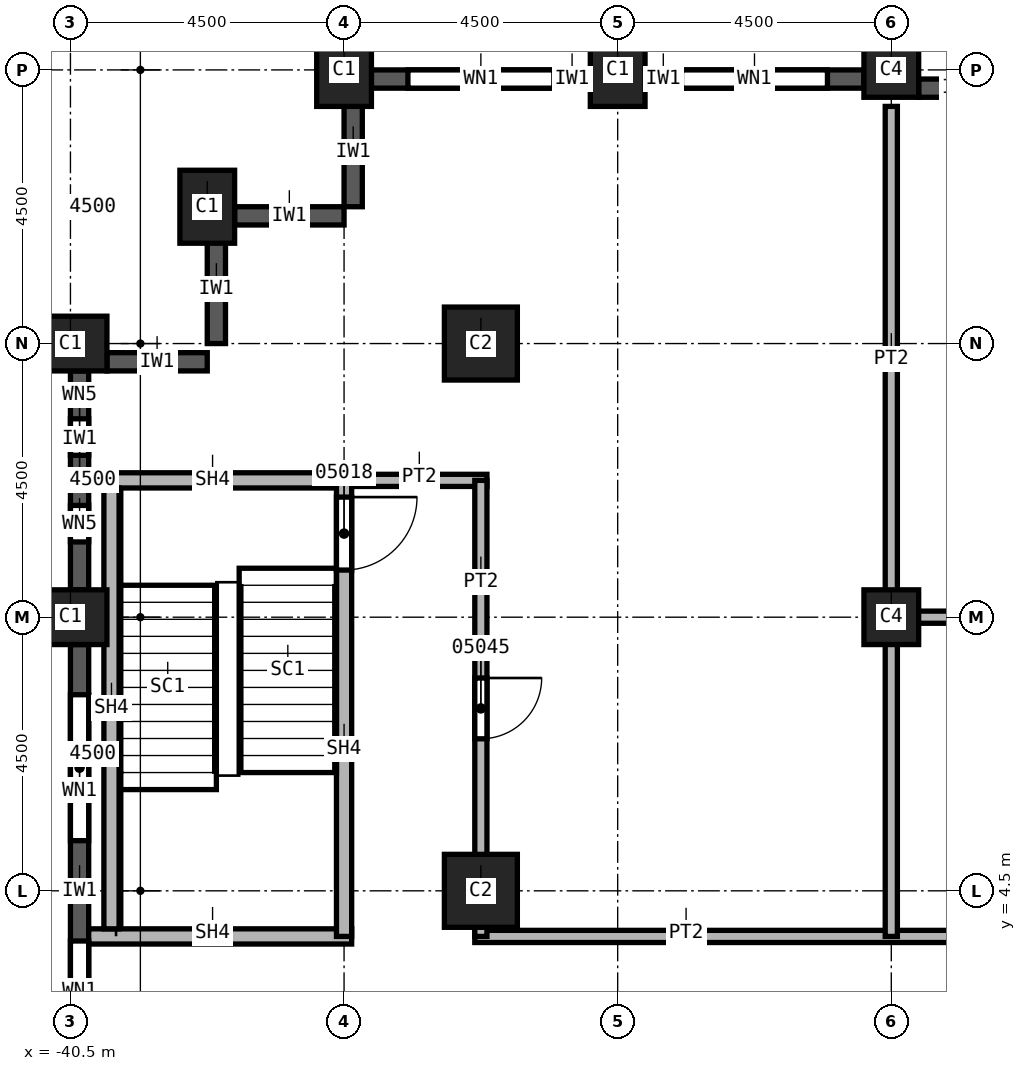
"""IFC4 building model, lengths in metres.
Left out: names, types, materials, properties, quantities, classifications, styles, units other than length and angle.
Written with IfcOpenShell. Run it as: python <this file> out.ifc"""

import sys

from ifc_helpers import new_model, si_unit, direction, frame, frame_2d, origin, origin_2d, place, context, subcontext, project, spatial, rectangle, extrude, element, fill, save


model = new_model("IFC4")
c1 = context("Model", 3, precision=1e-05, world=origin(), true_north=direction((0.0, 1.0)))
c2 = subcontext(c1, "Body", "Model", "MODEL_VIEW")
j1 = project(units=[si_unit("LENGTHUNIT", "METRE"), si_unit("PLANEANGLEUNIT", "RADIAN")], contexts=[c1])
p1 = place(None, origin())
s1 = spatial("IfcSite", under=j1, at=p1, CompositionType="ELEMENT")
p2 = place(p1, origin())
s2 = spatial("IfcBuilding", under=s1, at=p2, CompositionType="ELEMENT")
p3 = place(p2, frame((0.0, 0.0, 116.0)))
s3 = spatial("IfcBuildingStorey", under=s2, at=p3, CompositionType="ELEMENT", Elevation=116.0)
for number, where, z_axis, x_axis in (
    (1, (-40.5, 9.0, 0.0), (0.0, 0.0, 1.0), (0.0, 1.0, 0.0)),
    (2, (-40.5, 13.5, 0.0), (0.0, 0.0, 1.0), (0.0, 1.0, 0.0)),
    (3, (-38.25, 15.75, 0.0), (0.0, 0.0, 1.0), (1.0, 0.0, 0.0)),
    (4, (-31.5, 18.0, 0.0), (0.0, 0.0, 1.0), (1.0, 0.0, 0.0)),
    (5, (-36.0, 18.0, 0.0), (0.0, 0.0, 1.0), (1.0, 0.0, 0.0)),
):
    element("IfcColumn", number, at=place(p3, frame(where, z_axis=z_axis, x_axis=x_axis)), inside=s3, PredefinedType="COLUMN", context=c2, shape_type="SweptSolid", body=[
        extrude(rectangle(XDim=0.9, YDim=1.2, at=origin_2d()), origin(), (0.0, 0.0, 1.0), 3.6),
    ])
for number, where, z_axis, x_axis in (
    (6, (-33.75, 4.5, 0.0), (0.0, 0.0, 1.0), (1.0, 0.0, 0.0)),
    (7, (-33.75, 13.5, 0.0), (0.0, 0.0, 1.0), (1.0, 0.0, 0.0)),
):
    element("IfcColumn", number, at=place(p3, frame(where, z_axis=z_axis, x_axis=x_axis)), inside=s3, PredefinedType="COLUMN", context=c2, shape_type="SweptSolid", body=[
        extrude(rectangle(XDim=1.2, YDim=1.2, at=origin_2d()), origin(), (0.0, 0.0, 1.0), 3.6),
    ])
for number, where, z_axis, x_axis in (
    (8, (-27.0, 9.0, 0.0), (0.0, 0.0, 1.0), (1.0, 0.0, 0.0)),
    (9, (-27.0, 18.0, 0.0), (0.0, 0.0, 1.0), (1.0, 0.0, 0.0)),
):
    element("IfcColumn", number, at=place(p3, frame(where, z_axis=z_axis, x_axis=x_axis)), inside=s3, PredefinedType="COLUMN", context=c2, shape_type="SweptSolid", body=[
        extrude(rectangle(XDim=0.9, YDim=0.9, at=origin_2d()), origin(), (0.0, 0.0, 1.0), 3.6),
    ])
for number, where, z_axis, x_axis in (
    (10, (-35.85, 17.55, 0.0), (0.0, 0.0, 1.0), (0.0, -1.0, 0.0)),
    (11, (-37.8, 15.6, 0.0), (0.0, 0.0, 1.0), (1.0, 0.0, 0.0)),
    (12, (-38.1, 15.3, 0.0), (0.0, 0.0, 1.0), (0.0, -1.0, 0.0)),
):
    element("IfcWall", number, at=place(p3, frame(where, z_axis=z_axis, x_axis=x_axis)), inside=s3, PredefinedType="SOLIDWALL", context=c2, shape_type="SweptSolid", body=[
        extrude(rectangle(XDim=1.8, YDim=0.3, at=frame_2d((0.9, 0.0))), origin(), (0.0, 0.0, 1.0), 3.0),
    ])
p4 = place(p3, frame((-39.9, 13.2, 0.0), z_axis=(0.0, 0.0, 1.0), x_axis=(1.0, 0.0, 0.0)))
e13 = element("IfcWall", 13, at=p4, inside=s3, PredefinedType="SOLIDWALL", context=c2, shape_type="SweptSolid", body=[
    extrude(rectangle(XDim=1.65, YDim=0.3, at=frame_2d((0.825, 0.0))), origin(), (0.0, 0.0, 1.0), 3.0),
])
p5 = place(p3, frame((-25.2, 17.7, 0.0), z_axis=(0.0, 0.0, 1.0), x_axis=(-1.0, 0.0, 0.0)))
e14 = element("IfcWall", 14, at=p5, inside=s3, PredefinedType="SOLIDWALL", context=c2, shape_type="SweptSolid", body=[
    extrude(rectangle(XDim=1.35, YDim=0.3, at=frame_2d((0.675, 0.0))), origin(), (0.0, 0.0, 1.0), 3.0),
])
p6 = place(p3, frame((-27.45, 17.85, 0.0), z_axis=(0.0, 0.0, 1.0), x_axis=(-1.0, 0.0, 0.0)))
e15 = element("IfcWall", 15, at=p6, inside=s3, PredefinedType="SOLIDWALL", context=c2, shape_type="SweptSolid", body=[
    extrude(rectangle(XDim=3.6, YDim=0.3, at=frame_2d((1.8, 0.0))), origin(), (0.0, 0.0, 1.0), 3.0),
])
p7 = place(p6, frame((0.6, 0.0, 0.8)))
e16 = element("IfcOpeningElement", 16, at=p7, cuts=e15, PredefinedType="OPENING", context=c2, shape_type="SweptSolid", body=[
    extrude(rectangle(XDim=2.4, YDim=1.95, at=frame_2d((1.2, 0.975))), frame((0.0, 0.15, 0.0), z_axis=(0.0, -1.0, 0.0), x_axis=(1.0, 0.0, 0.0)), (0.0, 0.0, 1.0), 0.3),
])
p8 = place(p3, frame((-31.95, 17.85, 0.0), z_axis=(0.0, 0.0, 1.0), x_axis=(-1.0, 0.0, 0.0)))
e17 = element("IfcWall", 17, at=p8, inside=s3, PredefinedType="SOLIDWALL", context=c2, shape_type="SweptSolid", body=[
    extrude(rectangle(XDim=3.6, YDim=0.3, at=frame_2d((1.8, 0.0))), origin(), (0.0, 0.0, 1.0), 3.0),
])
p9 = place(p8, frame((0.6, 0.0, 0.8)))
e18 = element("IfcOpeningElement", 18, at=p9, cuts=e17, PredefinedType="OPENING", context=c2, shape_type="SweptSolid", body=[
    extrude(rectangle(XDim=2.4, YDim=1.95, at=frame_2d((1.2, 0.975))), frame((0.0, 0.15, 0.0), z_axis=(0.0, -1.0, 0.0), x_axis=(1.0, 0.0, 0.0)), (0.0, 0.0, 1.0), 0.3),
])
p10 = place(p3, frame((-40.35, 13.05, 0.0), z_axis=(0.0, 0.0, 1.0), x_axis=(0.0, -1.0, 0.0)))
e19 = element("IfcWall", 19, at=p10, inside=s3, PredefinedType="SOLIDWALL", context=c2, shape_type="SweptSolid", body=[
    extrude(rectangle(XDim=3.6, YDim=0.3, at=frame_2d((1.8, 0.0))), origin(), (0.0, 0.0, 1.0), 3.0),
])
p11 = place(p10, frame((0.788, 0.0, 0.8)))
e20 = element("IfcOpeningElement", 20, at=p11, cuts=e19, PredefinedType="OPENING", context=c2, shape_type="SweptSolid", body=[
    extrude(rectangle(XDim=0.6, YDim=1.95, at=frame_2d((0.3, 0.975))), frame((0.0, 0.15, 0.0), z_axis=(0.0, -1.0, 0.0), x_axis=(1.0, 0.0, 0.0)), (0.0, 0.0, 1.0), 0.3),
])
p12 = place(p10, frame((2.212, 0.0, 0.8)))
e21 = element("IfcOpeningElement", 21, at=p12, cuts=e19, PredefinedType="OPENING", context=c2, shape_type="SweptSolid", body=[
    extrude(rectangle(XDim=0.6, YDim=1.95, at=frame_2d((0.3, 0.975))), frame((0.0, 0.15, 0.0), z_axis=(0.0, -1.0, 0.0), x_axis=(1.0, 0.0, 0.0)), (0.0, 0.0, 1.0), 0.3),
])
p13 = place(p3, frame((-40.35, 8.55, 0.0), z_axis=(0.0, 0.0, 1.0), x_axis=(0.0, -1.0, 0.0)))
e22 = element("IfcWall", 22, at=p13, inside=s3, PredefinedType="SOLIDWALL", context=c2, shape_type="SweptSolid", body=[
    extrude(rectangle(XDim=8.1, YDim=0.3, at=frame_2d((4.05, 0.0))), origin(), (0.0, 0.0, 1.0), 3.0),
])
p14 = place(p13, frame((0.825, 0.0, 0.8)))
e23 = element("IfcOpeningElement", 23, at=p14, cuts=e22, PredefinedType="OPENING", context=c2, shape_type="SweptSolid", body=[
    extrude(rectangle(XDim=2.4, YDim=1.95, at=frame_2d((1.2, 0.975))), frame((0.0, 0.15, 0.0), z_axis=(0.0, -1.0, 0.0), x_axis=(1.0, 0.0, 0.0)), (0.0, 0.0, 1.0), 0.3),
])
p15 = place(p13, frame((4.875, 0.0, 0.8)))
e24 = element("IfcOpeningElement", 24, at=p15, cuts=e22, PredefinedType="OPENING", context=c2, shape_type="SweptSolid", body=[
    extrude(rectangle(XDim=2.4, YDim=1.95, at=frame_2d((1.2, 0.975))), frame((0.0, 0.15, 0.0), z_axis=(0.0, -1.0, 0.0), x_axis=(1.0, 0.0, 0.0)), (0.0, 0.0, 1.0), 0.3),
])
p16 = place(p3, frame((-36.0, 11.25, 0.0), z_axis=(0.0, 0.0, 1.0), x_axis=(1.0, 0.0, 0.0)))
e25 = element("IfcWall", 25, at=p16, inside=s3, PredefinedType="PARTITIONING", context=c2, shape_type="SweptSolid", body=[
    extrude(rectangle(XDim=2.35, YDim=0.2, at=frame_2d((1.175, 0.0))), origin(), (0.0, 0.0, 1.0), 3.6),
])
p17 = place(p3, frame((-33.85, 3.75, 0.0), z_axis=(0.0, 0.0, 1.0), x_axis=(1.0, 0.0, 0.0)))
e26 = element("IfcWall", 26, at=p17, inside=s3, PredefinedType="PARTITIONING", context=c2, shape_type="SweptSolid", body=[
    extrude(rectangle(XDim=13.95, YDim=0.2, at=frame_2d((6.975, 0.0))), origin(), (0.0, 0.0, 1.0), 3.6),
])
p18 = place(p17, frame((9.85, 0.0, 0.0)))
e27 = element("IfcOpeningElement", 27, at=p18, cuts=e26, PredefinedType="OPENING", context=c2, shape_type="SweptSolid", body=[
    extrude(rectangle(XDim=1.0, YDim=2.1, at=frame_2d((0.5, 1.05))), frame((0.0, 0.1, 0.0), z_axis=(0.0, -1.0, 0.0), x_axis=(1.0, 0.0, 0.0)), (0.0, 0.0, 1.0), 0.2),
])
p19 = place(p3, frame((-33.75, 11.25, 0.0), z_axis=(0.0, 0.0, 1.0), x_axis=(0.0, -1.0, 0.0)))
e28 = element("IfcWall", 28, at=p19, inside=s3, PredefinedType="PARTITIONING", context=c2, shape_type="SweptSolid", body=[
    extrude(rectangle(XDim=7.5, YDim=0.2, at=frame_2d((3.75, 0.0))), origin(), (0.0, 0.0, 1.0), 3.6),
])
p20 = place(p19, frame((3.25, 0.0, 0.0)))
e29 = element("IfcOpeningElement", 29, at=p20, cuts=e28, PredefinedType="OPENING", context=c2, shape_type="SweptSolid", body=[
    extrude(rectangle(XDim=1.0, YDim=2.1, at=frame_2d((0.5, 1.05))), frame((0.0, 0.1, 0.0), z_axis=(0.0, -1.0, 0.0), x_axis=(1.0, 0.0, 0.0)), (0.0, 0.0, 1.0), 0.2),
])
p21 = place(p3, frame((-27.1, 9.0, 0.0), z_axis=(0.0, 0.0, 1.0), x_axis=(1.0, 0.0, 0.0)))
e30 = element("IfcWall", 30, at=p21, inside=s3, PredefinedType="PARTITIONING", context=c2, shape_type="SweptSolid", body=[
    extrude(rectangle(XDim=7.2, YDim=0.2, at=frame_2d((3.6, 0.0))), origin(), (0.0, 0.0, 1.0), 3.6),
])
p22 = place(p3, frame((-27.0, 3.75, 0.0), z_axis=(0.0, 0.0, 1.0), x_axis=(0.0, 1.0, 0.0)))
e31 = element("IfcWall", 31, at=p22, inside=s3, PredefinedType="PARTITIONING", context=c2, shape_type="SweptSolid", body=[
    extrude(rectangle(XDim=13.65, YDim=0.2, at=frame_2d((6.825, 0.0))), origin(), (0.0, 0.0, 1.0), 3.6),
])
p23 = place(p3, frame((-40.2, 3.75, 0.0), z_axis=(0.0, 0.0, 1.0), x_axis=(1.0, 0.0, 0.0)))
e32 = element("IfcWall", 32, at=p23, inside=s3, PredefinedType="SOLIDWALL", context=c2, shape_type="SweptSolid", body=[
    extrude(rectangle(XDim=4.325, YDim=0.25, at=frame_2d((2.163, 0.0))), origin(), (0.0, 0.0, 1.0), 3.6),
])
p24 = place(p3, frame((-40.2, 11.25, 0.0), z_axis=(0.0, 0.0, 1.0), x_axis=(1.0, 0.0, 0.0)))
e33 = element("IfcWall", 33, at=p24, inside=s3, PredefinedType="SOLIDWALL", context=c2, shape_type="SweptSolid", body=[
    extrude(rectangle(XDim=4.2, YDim=0.25, at=frame_2d((2.1, 0.0))), origin(), (0.0, 0.0, 1.0), 3.6),
])
p25 = place(p3, frame((-36.0, 11.375, 0.0), z_axis=(0.0, 0.0, 1.0), x_axis=(0.0, -1.0, 0.0)))
e34 = element("IfcWall", 34, at=p25, inside=s3, PredefinedType="SOLIDWALL", context=c2, shape_type="SweptSolid", body=[
    extrude(rectangle(XDim=7.625, YDim=0.25, at=frame_2d((3.812, 0.0))), origin(), (0.0, 0.0, 1.0), 3.6),
])
p26 = place(p25, frame((0.4, 0.0, 0.0)))
e35 = element("IfcOpeningElement", 35, at=p26, cuts=e34, PredefinedType="OPENING", context=c2, shape_type="SweptSolid", body=[
    extrude(rectangle(XDim=1.2, YDim=2.1, at=frame_2d((0.6, 1.05))), frame((0.0, 0.125, 0.0), z_axis=(0.0, -1.0, 0.0), x_axis=(1.0, 0.0, 0.0)), (0.0, 0.0, 1.0), 0.25),
])
p27 = place(p3, frame((-39.825, 3.875, 0.0), z_axis=(0.0, 0.0, 1.0), x_axis=(0.0, 1.0, 0.0)))
e36 = element("IfcWall", 36, at=p27, inside=s3, PredefinedType="SOLIDWALL", context=c2, shape_type="SweptSolid", body=[
    extrude(rectangle(XDim=7.25, YDim=0.25, at=frame_2d((3.625, 0.0))), origin(), (0.0, 0.0, 1.0), 3.6),
])
p28 = place(p7, origin())
e37 = element("IfcWindow", 37, at=p28, inside=s3, PartitioningType="SINGLE_PANEL", PredefinedType="WINDOW", context=c2, shape_type="SweptSolid", body=[
    extrude(rectangle(XDim=2.4, YDim=1.95, at=frame_2d((1.2, 0.975))), frame((0.0, 0.03, 0.0), z_axis=(0.0, -1.0, 0.0), x_axis=(1.0, 0.0, 0.0)), (0.0, 0.0, 1.0), 0.06),
])
fill(e16, e37)
p29 = place(p9, origin())
e38 = element("IfcWindow", 38, at=p29, inside=s3, PartitioningType="SINGLE_PANEL", PredefinedType="WINDOW", context=c2, shape_type="SweptSolid", body=[
    extrude(rectangle(XDim=2.4, YDim=1.95, at=frame_2d((1.2, 0.975))), frame((0.0, 0.03, 0.0), z_axis=(0.0, -1.0, 0.0), x_axis=(1.0, 0.0, 0.0)), (0.0, 0.0, 1.0), 0.06),
])
fill(e18, e38)
p30 = place(p14, origin())
e39 = element("IfcWindow", 39, at=p30, inside=s3, PartitioningType="SINGLE_PANEL", PredefinedType="WINDOW", context=c2, shape_type="SweptSolid", body=[
    extrude(rectangle(XDim=2.4, YDim=1.95, at=frame_2d((1.2, 0.975))), frame((0.0, 0.03, 0.0), z_axis=(0.0, -1.0, 0.0), x_axis=(1.0, 0.0, 0.0)), (0.0, 0.0, 1.0), 0.06),
])
fill(e23, e39)
p31 = place(p15, origin())
e40 = element("IfcWindow", 40, at=p31, inside=s3, PartitioningType="SINGLE_PANEL", PredefinedType="WINDOW", context=c2, shape_type="SweptSolid", body=[
    extrude(rectangle(XDim=2.4, YDim=1.95, at=frame_2d((1.2, 0.975))), frame((0.0, 0.03, 0.0), z_axis=(0.0, -1.0, 0.0), x_axis=(1.0, 0.0, 0.0)), (0.0, 0.0, 1.0), 0.06),
])
fill(e24, e40)
p32 = place(p26, origin())
e41 = element("IfcDoor", 41, at=p32, inside=s3, OperationType="SINGLE_SWING_LEFT", PredefinedType="DOOR", context=c2, shape_type="SweptSolid", body=[
    extrude(rectangle(XDim=1.2, YDim=2.1, at=frame_2d((0.6, 1.05))), frame((0.0, 0.025, 0.0), z_axis=(0.0, -1.0, 0.0), x_axis=(1.0, 0.0, 0.0)), (0.0, 0.0, 1.0), 0.05),
])
fill(e35, e41)
p33 = place(p20, origin())
e42 = element("IfcDoor", 42, at=p33, inside=s3, OperationType="SINGLE_SWING_RIGHT", PredefinedType="DOOR", context=c2, shape_type="SweptSolid", body=[
    extrude(rectangle(XDim=1.0, YDim=2.1, at=frame_2d((0.5, 1.05))), frame((0.0, 0.025, 0.0), z_axis=(0.0, -1.0, 0.0), x_axis=(1.0, 0.0, 0.0)), (0.0, 0.0, 1.0), 0.05),
])
fill(e29, e42)
p34 = place(p11, origin())
e43 = element("IfcWindow", 43, at=p34, inside=s3, PartitioningType="SINGLE_PANEL", PredefinedType="WINDOW", context=c2, shape_type="SweptSolid", body=[
    extrude(rectangle(XDim=0.6, YDim=1.95, at=frame_2d((0.3, 0.975))), frame((0.0, 0.03, 0.0), z_axis=(0.0, -1.0, 0.0), x_axis=(1.0, 0.0, 0.0)), (0.0, 0.0, 1.0), 0.06),
])
fill(e20, e43)
p35 = place(p12, origin())
e44 = element("IfcWindow", 44, at=p35, inside=s3, PartitioningType="SINGLE_PANEL", PredefinedType="WINDOW", context=c2, shape_type="SweptSolid", body=[
    extrude(rectangle(XDim=0.6, YDim=1.95, at=frame_2d((0.3, 0.975))), frame((0.0, 0.03, 0.0), z_axis=(0.0, -1.0, 0.0), x_axis=(1.0, 0.0, 0.0)), (0.0, 0.0, 1.0), 0.06),
])
fill(e21, e44)
save(model, sys.argv[1])
